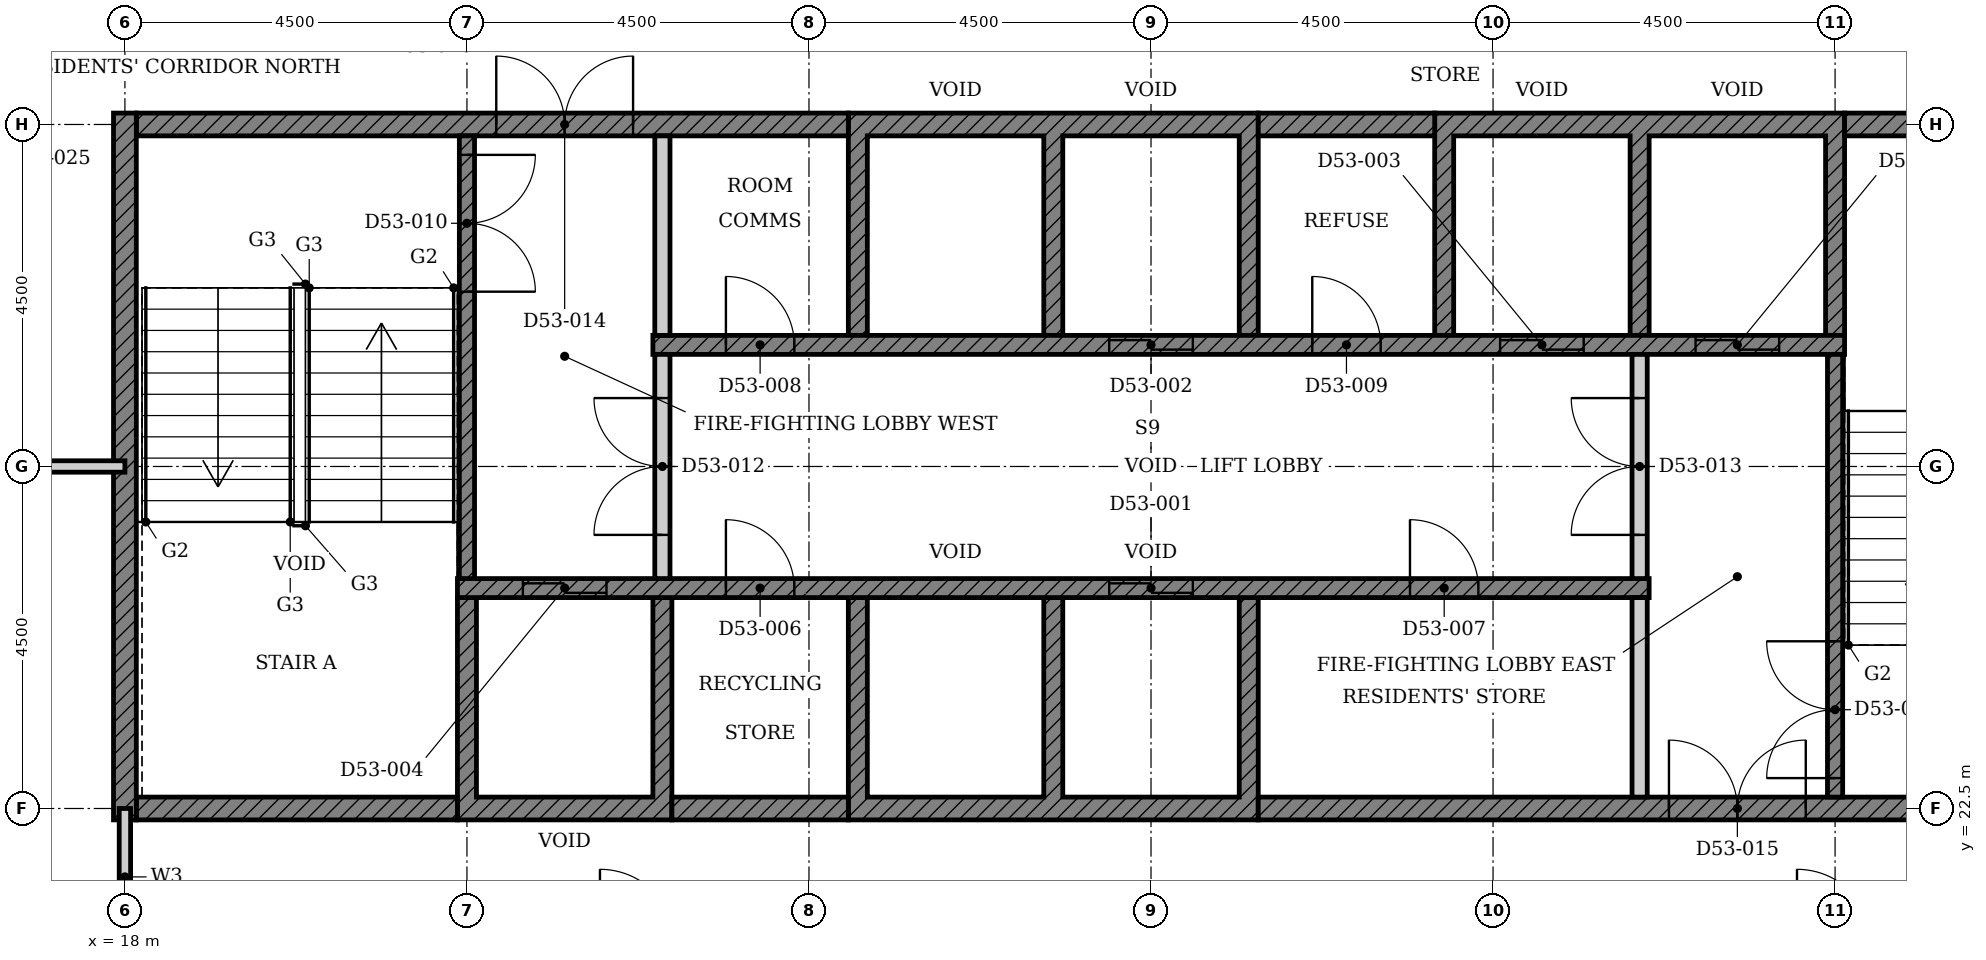
"""IFC4 building model, lengths in metres.
Left out: names, types, materials, properties, quantities, classifications, styles, units other than length and angle.
Written with IfcOpenShell. Run it as: python <this file> out.ifc"""

import sys

from ifc_helpers import new_model, si_unit, direction, frame, frame_2d, origin, place, context, subcontext, project, spatial, polyline, rectangle, outline, extrude, element, fill, save


model = new_model("IFC4")
c1 = context("Model", 3, precision=1e-05, world=origin(), true_north=direction((0.0, 1.0)))
c2 = subcontext(c1, "Body", "Model", "MODEL_VIEW")
j1 = project(units=[si_unit("LENGTHUNIT", "METRE"), si_unit("PLANEANGLEUNIT", "RADIAN")], contexts=[c1])
p1 = place(None, origin())
s1 = spatial("IfcSite", under=j1, at=p1, CompositionType="ELEMENT")
p2 = place(p1, origin())
s2 = spatial("IfcBuilding", under=s1, at=p2, CompositionType="ELEMENT")
p3 = place(p2, frame((0.0, 0.0, 210.9)))
s3 = spatial("IfcBuildingStorey", under=s2, at=p3, CompositionType="ELEMENT", Elevation=210.9)
p4 = place(p3, origin())
e1 = element("IfcWall", 1, at=p4, inside=s3, PredefinedType="SHEAR", context=c2, shape_type="SweptSolid", body=[
    extrude(outline(polyline([(22.375, 22.35), (25.197, 22.35), (25.197, 25.275), (24.947, 25.275), (24.947, 22.65), (22.625, 22.65), (22.625, 25.275), (22.375, 25.275), (22.375, 22.35)])), origin(), (0.0, 0.0, 1.0), 3.4),
])
p5 = place(p3, origin())
e2 = element("IfcWall", 2, at=p5, inside=s3, PredefinedType="SHEAR", context=c2, shape_type="SweptSolid", body=[
    extrude(outline(polyline([(27.518, 22.35), (32.911, 22.35), (32.911, 25.275), (32.661, 25.275), (32.661, 22.65), (30.339, 22.65), (30.339, 25.275), (30.089, 25.275), (30.089, 22.65), (27.768, 22.65), (27.768, 25.275), (27.518, 25.275), (27.518, 22.35)])), origin(), (0.0, 0.0, 1.0), 3.4),
])
p6 = place(p3, origin())
e3 = element("IfcWall", 3, at=p6, inside=s3, PredefinedType="SHEAR", context=c2, shape_type="SweptSolid", body=[
    extrude(outline(polyline([(27.518, 28.725), (27.768, 28.725), (27.768, 31.35), (30.089, 31.35), (30.089, 28.725), (30.339, 28.725), (30.339, 31.35), (32.661, 31.35), (32.661, 28.725), (32.911, 28.725), (32.911, 31.65), (27.518, 31.65), (27.518, 28.725)])), origin(), (0.0, 0.0, 1.0), 3.4),
])
p7 = place(p3, origin())
e4 = element("IfcWall", 4, at=p7, inside=s3, PredefinedType="SHEAR", context=c2, shape_type="SweptSolid", body=[
    extrude(outline(polyline([(35.232, 28.725), (35.482, 28.725), (35.482, 31.35), (37.803, 31.35), (37.803, 28.725), (38.053, 28.725), (38.053, 31.35), (40.375, 31.35), (40.375, 28.725), (40.625, 28.725), (40.625, 31.65), (35.232, 31.65), (35.232, 28.725)])), origin(), (0.0, 0.0, 1.0), 3.4),
])
p8 = place(p3, frame((18.15, 22.5, 0.0), z_axis=(0.0, 0.0, 1.0), x_axis=(1.0, 0.0, 0.0)))
e5 = element("IfcWall", 5, at=p8, inside=s3, PredefinedType="SHEAR", context=c2, shape_type="SweptSolid", body=[
    extrude(rectangle(XDim=4.225, YDim=0.3, at=frame_2d((2.113, 0.0))), origin(), (0.0, 0.0, 1.0), 3.4),
])
p9 = place(p3, frame((25.197, 22.5, 0.0), z_axis=(0.0, 0.0, 1.0), x_axis=(1.0, 0.0, 0.0)))
e6 = element("IfcWall", 6, at=p9, inside=s3, PredefinedType="SHEAR", context=c2, shape_type="SweptSolid", body=[
    extrude(rectangle(XDim=2.321, YDim=0.3, at=frame_2d((1.161, 0.0))), origin(), (0.0, 0.0, 1.0), 3.4),
])
p10 = place(p3, frame((32.911, 22.5, 0.0), z_axis=(0.0, 0.0, 1.0), x_axis=(1.0, 0.0, 0.0)))
e7 = element("IfcWall", 7, at=p10, inside=s3, PredefinedType="SHEAR", context=c2, shape_type="SweptSolid", body=[
    extrude(rectangle(XDim=11.939, YDim=0.3, at=frame_2d((5.97, 0.0))), origin(), (0.0, 0.0, 1.0), 3.4),
])
p11 = place(p10, frame((5.404, 0.0, 0.0)))
e8 = element("IfcOpeningElement", 8, at=p11, cuts=e7, PredefinedType="OPENING", context=c2, shape_type="SweptSolid", body=[
    extrude(rectangle(XDim=1.8, YDim=2.1, at=frame_2d((0.9, 1.05))), frame((0.0, 0.16, 0.0), z_axis=(0.0, -1.0, 0.0), x_axis=(1.0, 0.0, 0.0)), (0.0, 0.0, 1.0), 0.32),
])
p12 = place(p3, frame((18.15, 31.5, 0.0), z_axis=(0.0, 0.0, 1.0), x_axis=(1.0, 0.0, 0.0)))
e9 = element("IfcWall", 9, at=p12, inside=s3, PredefinedType="SHEAR", context=c2, shape_type="SweptSolid", body=[
    extrude(rectangle(XDim=9.368, YDim=0.3, at=frame_2d((4.684, 0.0))), origin(), (0.0, 0.0, 1.0), 3.4),
])
p13 = place(p12, frame((4.736, 0.0, 0.0)))
e10 = element("IfcOpeningElement", 10, at=p13, cuts=e9, PredefinedType="OPENING", context=c2, shape_type="SweptSolid", body=[
    extrude(rectangle(XDim=1.8, YDim=2.1, at=frame_2d((0.9, 1.05))), frame((0.0, 0.16, 0.0), z_axis=(0.0, -1.0, 0.0), x_axis=(1.0, 0.0, 0.0)), (0.0, 0.0, 1.0), 0.32),
])
p14 = place(p3, frame((32.911, 31.5, 0.0), z_axis=(0.0, 0.0, 1.0), x_axis=(1.0, 0.0, 0.0)))
e11 = element("IfcWall", 11, at=p14, inside=s3, PredefinedType="SHEAR", context=c2, shape_type="SweptSolid", body=[
    extrude(rectangle(XDim=2.322, YDim=0.3, at=frame_2d((1.161, 0.0))), origin(), (0.0, 0.0, 1.0), 3.4),
])
p15 = place(p3, frame((40.625, 31.5, 0.0), z_axis=(0.0, 0.0, 1.0), x_axis=(1.0, 0.0, 0.0)))
e12 = element("IfcWall", 12, at=p15, inside=s3, PredefinedType="SHEAR", context=c2, shape_type="SweptSolid", body=[
    extrude(rectangle(XDim=4.225, YDim=0.3, at=frame_2d((2.113, 0.0))), origin(), (0.0, 0.0, 1.0), 3.4),
])
p16 = place(p3, frame((18.0, 22.35, 0.0), z_axis=(0.0, 0.0, 1.0), x_axis=(0.0, 1.0, 0.0)))
e13 = element("IfcWall", 13, at=p16, inside=s3, PredefinedType="SHEAR", context=c2, shape_type="SweptSolid", body=[
    extrude(rectangle(XDim=9.3, YDim=0.3, at=frame_2d((4.65, 0.0))), origin(), (0.0, 0.0, 1.0), 3.4),
])
p17 = place(p3, frame((22.375, 25.4, 0.0), z_axis=(0.0, 0.0, 1.0), x_axis=(1.0, 0.0, 0.0)))
e14 = element("IfcWall", 14, at=p17, inside=s3, PredefinedType="SHEAR", context=c2, shape_type="SweptSolid", body=[
    extrude(rectangle(XDim=15.678, YDim=0.25, at=frame_2d((7.839, 0.0))), origin(), (0.0, 0.0, 1.0), 3.4),
])
p18 = place(p17, frame((8.575, 0.0, 0.0)))
e15 = element("IfcOpeningElement", 15, at=p18, cuts=e14, PredefinedType="OPENING", context=c2, shape_type="SweptSolid", body=[
    extrude(rectangle(XDim=1.1, YDim=2.1, at=frame_2d((0.55, 1.05))), frame((0.0, 0.135, 0.0), z_axis=(0.0, -1.0, 0.0), x_axis=(1.0, 0.0, 0.0)), (0.0, 0.0, 1.0), 0.27),
])
p19 = place(p17, frame((0.861, 0.0, 0.0)))
e16 = element("IfcOpeningElement", 16, at=p19, cuts=e14, PredefinedType="OPENING", context=c2, shape_type="SweptSolid", body=[
    extrude(rectangle(XDim=1.1, YDim=2.1, at=frame_2d((0.55, 1.05))), frame((0.0, 0.135, 0.0), z_axis=(0.0, -1.0, 0.0), x_axis=(1.0, 0.0, 0.0)), (0.0, 0.0, 1.0), 0.27),
])
p20 = place(p17, frame((3.532, 0.0, 0.0)))
e17 = element("IfcOpeningElement", 17, at=p20, cuts=e14, PredefinedType="OPENING", context=c2, shape_type="SweptSolid", body=[
    extrude(rectangle(XDim=0.9, YDim=2.1, at=frame_2d((0.45, 1.05))), frame((0.0, 0.135, 0.0), z_axis=(0.0, -1.0, 0.0), x_axis=(1.0, 0.0, 0.0)), (0.0, 0.0, 1.0), 0.27),
])
p21 = place(p17, frame((12.532, 0.0, 0.0)))
e18 = element("IfcOpeningElement", 18, at=p21, cuts=e14, PredefinedType="OPENING", context=c2, shape_type="SweptSolid", body=[
    extrude(rectangle(XDim=0.9, YDim=2.1, at=frame_2d((0.45, 1.05))), frame((0.0, 0.135, 0.0), z_axis=(0.0, -1.0, 0.0), x_axis=(1.0, 0.0, 0.0)), (0.0, 0.0, 1.0), 0.27),
])
p22 = place(p3, frame((24.947, 28.6, 0.0), z_axis=(0.0, 0.0, 1.0), x_axis=(1.0, 0.0, 0.0)))
e19 = element("IfcWall", 19, at=p22, inside=s3, PredefinedType="SHEAR", context=c2, shape_type="SweptSolid", body=[
    extrude(rectangle(XDim=15.678, YDim=0.25, at=frame_2d((7.839, 0.0))), origin(), (0.0, 0.0, 1.0), 3.4),
])
p23 = place(p22, frame((6.004, 0.0, 0.0)))
e20 = element("IfcOpeningElement", 20, at=p23, cuts=e19, PredefinedType="OPENING", context=c2, shape_type="SweptSolid", body=[
    extrude(rectangle(XDim=1.1, YDim=2.1, at=frame_2d((0.55, 1.05))), frame((0.0, 0.135, 0.0), z_axis=(0.0, -1.0, 0.0), x_axis=(1.0, 0.0, 0.0)), (0.0, 0.0, 1.0), 0.27),
])
p24 = place(p22, frame((11.146, 0.0, 0.0)))
e21 = element("IfcOpeningElement", 21, at=p24, cuts=e19, PredefinedType="OPENING", context=c2, shape_type="SweptSolid", body=[
    extrude(rectangle(XDim=1.1, YDim=2.1, at=frame_2d((0.55, 1.05))), frame((0.0, 0.135, 0.0), z_axis=(0.0, -1.0, 0.0), x_axis=(1.0, 0.0, 0.0)), (0.0, 0.0, 1.0), 0.27),
])
p25 = place(p22, frame((13.718, 0.0, 0.0)))
e22 = element("IfcOpeningElement", 22, at=p25, cuts=e19, PredefinedType="OPENING", context=c2, shape_type="SweptSolid", body=[
    extrude(rectangle(XDim=1.1, YDim=2.1, at=frame_2d((0.55, 1.05))), frame((0.0, 0.135, 0.0), z_axis=(0.0, -1.0, 0.0), x_axis=(1.0, 0.0, 0.0)), (0.0, 0.0, 1.0), 0.27),
])
p26 = place(p22, frame((0.961, 0.0, 0.0)))
e23 = element("IfcOpeningElement", 23, at=p26, cuts=e19, PredefinedType="OPENING", context=c2, shape_type="SweptSolid", body=[
    extrude(rectangle(XDim=0.9, YDim=2.1, at=frame_2d((0.45, 1.05))), frame((0.0, 0.135, 0.0), z_axis=(0.0, -1.0, 0.0), x_axis=(1.0, 0.0, 0.0)), (0.0, 0.0, 1.0), 0.27),
])
p27 = place(p22, frame((8.675, 0.0, 0.0)))
e24 = element("IfcOpeningElement", 24, at=p27, cuts=e19, PredefinedType="OPENING", context=c2, shape_type="SweptSolid", body=[
    extrude(rectangle(XDim=0.9, YDim=2.1, at=frame_2d((0.45, 1.05))), frame((0.0, 0.135, 0.0), z_axis=(0.0, -1.0, 0.0), x_axis=(1.0, 0.0, 0.0)), (0.0, 0.0, 1.0), 0.27),
])
for number, where, z_axis, x_axis in (
    (25, (37.928, 22.65, 0.0), (0.0, 0.0, 1.0), (0.0, 1.0, 0.0)),
    (26, (25.072, 28.725, 0.0), (0.0, 0.0, 1.0), (0.0, 1.0, 0.0)),
):
    element("IfcWall", number, at=place(p3, frame(where, z_axis=z_axis, x_axis=x_axis)), inside=s3, PredefinedType="PARTITIONING", context=c2, shape_type="SweptSolid", body=[
        extrude(rectangle(XDim=2.625, YDim=0.2, at=frame_2d((1.312, 0.0))), origin(), (0.0, 0.0, 1.0), 3.4),
    ])
p28 = place(p3, frame((22.5, 31.35, 0.0), z_axis=(0.0, 0.0, 1.0), x_axis=(0.0, -1.0, 0.0)))
e27 = element("IfcWall", 27, at=p28, inside=s3, PredefinedType="SHEAR", context=c2, shape_type="SweptSolid", body=[
    extrude(rectangle(XDim=5.825, YDim=0.2, at=frame_2d((2.913, 0.0))), origin(), (0.0, 0.0, 1.0), 3.4),
])
p29 = place(p28, frame((0.25, 0.0, 0.0)))
e28 = element("IfcOpeningElement", 28, at=p29, cuts=e27, PredefinedType="OPENING", context=c2, shape_type="SweptSolid", body=[
    extrude(rectangle(XDim=1.8, YDim=2.1, at=frame_2d((0.9, 1.05))), frame((0.0, 0.11, 0.0), z_axis=(0.0, -1.0, 0.0), x_axis=(1.0, 0.0, 0.0)), (0.0, 0.0, 1.0), 0.22),
])
p30 = place(p3, frame((40.5, 22.65, 0.0), z_axis=(0.0, 0.0, 1.0), x_axis=(0.0, 1.0, 0.0)))
e29 = element("IfcWall", 29, at=p30, inside=s3, PredefinedType="SHEAR", context=c2, shape_type="SweptSolid", body=[
    extrude(rectangle(XDim=5.825, YDim=0.2, at=frame_2d((2.913, 0.0))), origin(), (0.0, 0.0, 1.0), 3.4),
])
p31 = place(p30, frame((0.25, 0.0, 0.0)))
e30 = element("IfcOpeningElement", 30, at=p31, cuts=e29, PredefinedType="OPENING", context=c2, shape_type="SweptSolid", body=[
    extrude(rectangle(XDim=1.8, YDim=2.1, at=frame_2d((0.9, 1.05))), frame((0.0, 0.11, 0.0), z_axis=(0.0, -1.0, 0.0), x_axis=(1.0, 0.0, 0.0)), (0.0, 0.0, 1.0), 0.22),
])
p32 = place(p3, frame((25.072, 25.525, 0.0), z_axis=(0.0, 0.0, 1.0), x_axis=(0.0, 1.0, 0.0)))
e31 = element("IfcWall", 31, at=p32, inside=s3, PredefinedType="PARTITIONING", context=c2, shape_type="SweptSolid", body=[
    extrude(rectangle(XDim=2.95, YDim=0.2, at=frame_2d((1.475, 0.0))), origin(), (0.0, 0.0, 1.0), 3.4),
])
p33 = place(p32, frame((0.575, 0.0, 0.0)))
e32 = element("IfcOpeningElement", 32, at=p33, cuts=e31, PredefinedType="OPENING", context=c2, shape_type="SweptSolid", body=[
    extrude(rectangle(XDim=1.8, YDim=2.1, at=frame_2d((0.9, 1.05))), frame((0.0, 0.11, 0.0), z_axis=(0.0, -1.0, 0.0), x_axis=(1.0, 0.0, 0.0)), (0.0, 0.0, 1.0), 0.22),
])
p34 = place(p3, frame((37.928, 25.525, 0.0), z_axis=(0.0, 0.0, 1.0), x_axis=(0.0, 1.0, 0.0)))
e33 = element("IfcWall", 33, at=p34, inside=s3, PredefinedType="PARTITIONING", context=c2, shape_type="SweptSolid", body=[
    extrude(rectangle(XDim=2.95, YDim=0.2, at=frame_2d((1.475, 0.0))), origin(), (0.0, 0.0, 1.0), 3.4),
])
p35 = place(p34, frame((0.575, 0.0, 0.0)))
e34 = element("IfcOpeningElement", 34, at=p35, cuts=e33, PredefinedType="OPENING", context=c2, shape_type="SweptSolid", body=[
    extrude(rectangle(XDim=1.8, YDim=2.1, at=frame_2d((0.9, 1.05))), frame((0.0, 0.11, 0.0), z_axis=(0.0, -1.0, 0.0), x_axis=(1.0, 0.0, 0.0)), (0.0, 0.0, 1.0), 0.22),
])
p36 = place(p3, frame((4.5, 27.0, 0.0), z_axis=(0.0, 0.0, 1.0), x_axis=(1.0, 0.0, 0.0)))
e35 = element("IfcWall", 35, at=p36, inside=s3, PredefinedType="PARTITIONING", context=c2, shape_type="SweptSolid", body=[
    extrude(rectangle(XDim=13.5, YDim=0.15, at=frame_2d((6.75, 0.0))), origin(), (0.0, 0.0, 1.0), 2.68),
])
p37 = place(p36, frame((5.35, 0.0, 0.0)))
e36 = element("IfcOpeningElement", 36, at=p37, cuts=e35, PredefinedType="OPENING", context=c2, shape_type="SweptSolid", body=[
    extrude(rectangle(XDim=1.0, YDim=2.1, at=frame_2d((0.5, 1.05))), frame((0.0, 0.085, 0.0), z_axis=(0.0, -1.0, 0.0), x_axis=(1.0, 0.0, 0.0)), (0.0, 0.0, 1.0), 0.17),
])
p38 = place(p3, frame((18.0, 20.7, 0.0), z_axis=(0.0, 0.0, 1.0), x_axis=(0.0, 1.0, 0.0)))
e37 = element("IfcWall", 37, at=p38, inside=s3, PredefinedType="PARTITIONING", context=c2, shape_type="SweptSolid", body=[
    extrude(rectangle(XDim=1.8, YDim=0.15, at=frame_2d((0.9, 0.0))), origin(), (0.0, 0.0, 1.0), 3.4),
])
p39 = place(p18, origin())
e38 = element("IfcDoor", 38, at=p39, inside=s3, OperationType="DOUBLE_DOOR_SLIDING", PredefinedType="DOOR", context=c2, shape_type="SweptSolid", body=[
    extrude(rectangle(XDim=1.1, YDim=2.1, at=frame_2d((0.55, 1.05))), frame((0.0, 0.025, 0.0), z_axis=(0.0, -1.0, 0.0), x_axis=(1.0, 0.0, 0.0)), (0.0, 0.0, 1.0), 0.05),
])
fill(e15, e38)
p40 = place(p23, origin())
e39 = element("IfcDoor", 39, at=p40, inside=s3, OperationType="DOUBLE_DOOR_SLIDING", PredefinedType="DOOR", context=c2, shape_type="SweptSolid", body=[
    extrude(rectangle(XDim=1.1, YDim=2.1, at=frame_2d((0.55, 1.05))), frame((0.0, 0.025, 0.0), z_axis=(0.0, -1.0, 0.0), x_axis=(1.0, 0.0, 0.0)), (0.0, 0.0, 1.0), 0.05),
])
fill(e20, e39)
p41 = place(p24, origin())
e40 = element("IfcDoor", 40, at=p41, inside=s3, OperationType="DOUBLE_DOOR_SLIDING", PredefinedType="DOOR", context=c2, shape_type="SweptSolid", body=[
    extrude(rectangle(XDim=1.1, YDim=2.1, at=frame_2d((0.55, 1.05))), frame((0.0, 0.025, 0.0), z_axis=(0.0, -1.0, 0.0), x_axis=(1.0, 0.0, 0.0)), (0.0, 0.0, 1.0), 0.05),
])
fill(e21, e40)
p42 = place(p19, origin())
e41 = element("IfcDoor", 41, at=p42, inside=s3, OperationType="DOUBLE_DOOR_SLIDING", PredefinedType="DOOR", context=c2, shape_type="SweptSolid", body=[
    extrude(rectangle(XDim=1.1, YDim=2.1, at=frame_2d((0.55, 1.05))), frame((0.0, 0.025, 0.0), z_axis=(0.0, -1.0, 0.0), x_axis=(1.0, 0.0, 0.0)), (0.0, 0.0, 1.0), 0.05),
])
fill(e16, e41)
p43 = place(p25, origin())
e42 = element("IfcDoor", 42, at=p43, inside=s3, OperationType="DOUBLE_DOOR_SLIDING", PredefinedType="DOOR", context=c2, shape_type="SweptSolid", body=[
    extrude(rectangle(XDim=1.1, YDim=2.1, at=frame_2d((0.55, 1.05))), frame((0.0, 0.025, 0.0), z_axis=(0.0, -1.0, 0.0), x_axis=(1.0, 0.0, 0.0)), (0.0, 0.0, 1.0), 0.05),
])
fill(e22, e42)
p44 = place(p20, origin())
e43 = element("IfcDoor", 43, at=p44, inside=s3, OperationType="SINGLE_SWING_LEFT", PredefinedType="DOOR", context=c2, shape_type="SweptSolid", body=[
    extrude(rectangle(XDim=0.9, YDim=2.1, at=frame_2d((0.45, 1.05))), frame((0.0, 0.025, 0.0), z_axis=(0.0, -1.0, 0.0), x_axis=(1.0, 0.0, 0.0)), (0.0, 0.0, 1.0), 0.05),
])
fill(e17, e43)
p45 = place(p21, origin())
e44 = element("IfcDoor", 44, at=p45, inside=s3, OperationType="SINGLE_SWING_LEFT", PredefinedType="DOOR", context=c2, shape_type="SweptSolid", body=[
    extrude(rectangle(XDim=0.9, YDim=2.1, at=frame_2d((0.45, 1.05))), frame((0.0, 0.025, 0.0), z_axis=(0.0, -1.0, 0.0), x_axis=(1.0, 0.0, 0.0)), (0.0, 0.0, 1.0), 0.05),
])
fill(e18, e44)
p46 = place(p26, origin())
e45 = element("IfcDoor", 45, at=p46, inside=s3, OperationType="SINGLE_SWING_LEFT", PredefinedType="DOOR", context=c2, shape_type="SweptSolid", body=[
    extrude(rectangle(XDim=0.9, YDim=2.1, at=frame_2d((0.45, 1.05))), frame((0.0, 0.025, 0.0), z_axis=(0.0, -1.0, 0.0), x_axis=(1.0, 0.0, 0.0)), (0.0, 0.0, 1.0), 0.05),
])
fill(e23, e45)
p47 = place(p27, origin())
e46 = element("IfcDoor", 46, at=p47, inside=s3, OperationType="SINGLE_SWING_LEFT", PredefinedType="DOOR", context=c2, shape_type="SweptSolid", body=[
    extrude(rectangle(XDim=0.9, YDim=2.1, at=frame_2d((0.45, 1.05))), frame((0.0, 0.025, 0.0), z_axis=(0.0, -1.0, 0.0), x_axis=(1.0, 0.0, 0.0)), (0.0, 0.0, 1.0), 0.05),
])
fill(e24, e46)
p48 = place(p29, origin())
e47 = element("IfcDoor", 47, at=p48, inside=s3, OperationType="DOUBLE_DOOR_SINGLE_SWING", PredefinedType="DOOR", context=c2, shape_type="SweptSolid", body=[
    extrude(rectangle(XDim=1.8, YDim=2.1, at=frame_2d((0.9, 1.05))), frame((0.0, 0.025, 0.0), z_axis=(0.0, -1.0, 0.0), x_axis=(1.0, 0.0, 0.0)), (0.0, 0.0, 1.0), 0.05),
])
fill(e28, e47)
p49 = place(p31, origin())
e48 = element("IfcDoor", 48, at=p49, inside=s3, OperationType="DOUBLE_DOOR_SINGLE_SWING", PredefinedType="DOOR", context=c2, shape_type="SweptSolid", body=[
    extrude(rectangle(XDim=1.8, YDim=2.1, at=frame_2d((0.9, 1.05))), frame((0.0, 0.025, 0.0), z_axis=(0.0, -1.0, 0.0), x_axis=(1.0, 0.0, 0.0)), (0.0, 0.0, 1.0), 0.05),
])
fill(e30, e48)
p50 = place(p33, origin())
e49 = element("IfcDoor", 49, at=p50, inside=s3, OperationType="DOUBLE_DOOR_SINGLE_SWING", PredefinedType="DOOR", context=c2, shape_type="SweptSolid", body=[
    extrude(rectangle(XDim=1.8, YDim=2.1, at=frame_2d((0.9, 1.05))), frame((0.0, 0.025, 0.0), z_axis=(0.0, -1.0, 0.0), x_axis=(1.0, 0.0, 0.0)), (0.0, 0.0, 1.0), 0.05),
])
fill(e32, e49)
p51 = place(p35, origin())
e50 = element("IfcDoor", 50, at=p51, inside=s3, OperationType="DOUBLE_DOOR_SINGLE_SWING", PredefinedType="DOOR", context=c2, shape_type="SweptSolid", body=[
    extrude(rectangle(XDim=1.8, YDim=2.1, at=frame_2d((0.9, 1.05))), frame((0.0, 0.025, 0.0), z_axis=(0.0, -1.0, 0.0), x_axis=(1.0, 0.0, 0.0)), (0.0, 0.0, 1.0), 0.05),
])
fill(e34, e50)
p52 = place(p13, origin())
e51 = element("IfcDoor", 51, at=p52, inside=s3, OperationType="DOUBLE_DOOR_SINGLE_SWING", PredefinedType="DOOR", context=c2, shape_type="SweptSolid", body=[
    extrude(rectangle(XDim=1.8, YDim=2.1, at=frame_2d((0.9, 1.05))), frame((0.0, 0.025, 0.0), z_axis=(0.0, -1.0, 0.0), x_axis=(1.0, 0.0, 0.0)), (0.0, 0.0, 1.0), 0.05),
])
fill(e10, e51)
p53 = place(p11, origin())
e52 = element("IfcDoor", 52, at=p53, inside=s3, OperationType="DOUBLE_DOOR_SINGLE_SWING", PredefinedType="DOOR", context=c2, shape_type="SweptSolid", body=[
    extrude(rectangle(XDim=1.8, YDim=2.1, at=frame_2d((0.9, 1.05))), frame((0.0, 0.025, 0.0), z_axis=(0.0, -1.0, 0.0), x_axis=(1.0, 0.0, 0.0)), (0.0, 0.0, 1.0), 0.05),
])
fill(e8, e52)
save(model, sys.argv[1])
